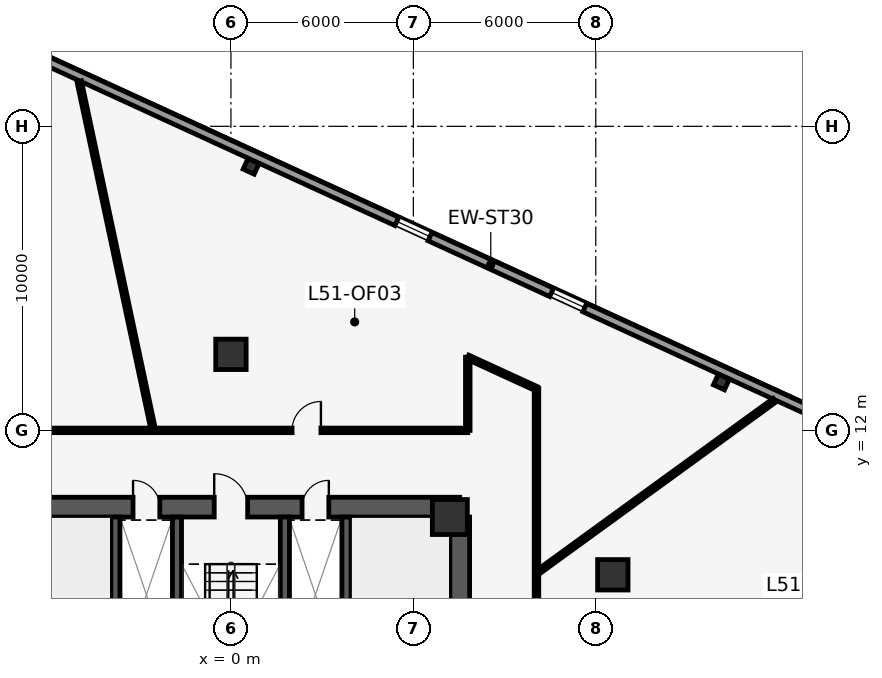
"""IFC4 building model, lengths in metres.
Left out: names, types, materials, properties, quantities, classifications, styles, units other than length and angle.
Written with IfcOpenShell. Run it as: python <this file> out.ifc"""

import sys

from ifc_helpers import new_model, si_unit, direction, frame, frame_2d, origin, origin_2d, place, context, subcontext, project, spatial, rectangle, i_section, extrude, element, fill, save


model = new_model("IFC4")
c1 = context("Model", 3, precision=1e-05, world=origin(), true_north=direction((0.0, 1.0)))
c2 = subcontext(c1, "Body", "Model", "MODEL_VIEW")
j1 = project(units=[si_unit("LENGTHUNIT", "METRE"), si_unit("PLANEANGLEUNIT", "RADIAN")], contexts=[c1])
p1 = place(None, origin())
s1 = spatial("IfcSite", under=j1, at=p1, CompositionType="ELEMENT")
p2 = place(p1, origin())
s2 = spatial("IfcBuilding", under=s1, at=p2, CompositionType="ELEMENT")
p3 = place(p2, frame((0.0, 0.0, 218.8)))
s3 = spatial("IfcBuildingStorey", under=s2, at=p3, CompositionType="ELEMENT", Elevation=218.8)
p4 = place(p3, frame((-7.525, 9.475, 0.0), z_axis=(0.0, 0.0, 1.0), x_axis=(1.0, 0.0, 0.0)))
e1 = element("IfcWall", 1, at=p4, inside=s3, PredefinedType="SHEAR", context=c2, shape_type="SweptSolid", body=[
    extrude(rectangle(XDim=15.05, YDim=0.65, at=frame_2d((7.525, 0.0))), origin(), (0.0, 0.0, 1.0), 3.85),
])
p5 = place(p4, frame((6.975, 0.0, 0.0)))
e2 = element("IfcOpeningElement", 2, at=p5, cuts=e1, PredefinedType="OPENING", context=c2, shape_type="SweptSolid", body=[
    extrude(rectangle(XDim=1.1, YDim=2.15, at=frame_2d((0.55, 1.075))), frame((0.0, 0.335, 0.0), z_axis=(0.0, -1.0, 0.0), x_axis=(1.0, 0.0, 0.0)), (0.0, 0.0, 1.0), 0.67),
])
p6 = place(p4, frame((4.305, 0.0, 0.0)))
e3 = element("IfcOpeningElement", 3, at=p6, cuts=e1, PredefinedType="OPENING", context=c2, shape_type="SweptSolid", body=[
    extrude(rectangle(XDim=0.88, YDim=2.15, at=frame_2d((0.44, 1.075))), frame((0.0, 0.335, 0.0), z_axis=(0.0, -1.0, 0.0), x_axis=(1.0, 0.0, 0.0)), (0.0, 0.0, 1.0), 0.67),
])
p7 = place(p4, frame((9.865, 0.0, 0.0)))
e4 = element("IfcOpeningElement", 4, at=p7, cuts=e1, PredefinedType="OPENING", context=c2, shape_type="SweptSolid", body=[
    extrude(rectangle(XDim=0.88, YDim=2.15, at=frame_2d((0.44, 1.075))), frame((0.0, 0.335, 0.0), z_axis=(0.0, -1.0, 0.0), x_axis=(1.0, 0.0, 0.0)), (0.0, 0.0, 1.0), 0.67),
])
for number, where, z_axis, x_axis in (
    (5, (-3.8, 1.45, 0.0), (0.0, 0.0, 1.0), (0.0, 1.0, 0.0)),
    (6, (-1.775, 1.45, 0.0), (0.0, 0.0, 1.0), (0.0, 1.0, 0.0)),
    (7, (1.775, 1.45, 0.0), (0.0, 0.0, 1.0), (0.0, 1.0, 0.0)),
    (8, (3.8, 1.45, 0.0), (0.0, 0.0, 1.0), (0.0, 1.0, 0.0)),
):
    element("IfcWall", number, at=place(p3, frame(where, z_axis=z_axis, x_axis=x_axis)), inside=s3, PredefinedType="SHEAR", context=c2, shape_type="SweptSolid", body=[
        extrude(rectangle(XDim=7.7, YDim=0.3, at=frame_2d((3.85, 0.0))), origin(), (0.0, 0.0, 1.0), 3.85),
    ])
p8 = place(p3, frame((7.525, 0.1, 0.0), z_axis=(0.0, 0.0, 1.0), x_axis=(0.0, 1.0, 0.0)))
e9 = element("IfcWall", 9, at=p8, inside=s3, PredefinedType="SHEAR", context=c2, shape_type="SweptSolid", body=[
    extrude(rectangle(XDim=9.05, YDim=0.65, at=frame_2d((4.525, 0.0))), origin(), (0.0, 0.0, 1.0), 3.85),
])
p9 = place(p3, frame((7.2, 9.15, 0.0), z_axis=(0.0, 0.0, 1.0), x_axis=(1.0, 0.0, 0.0)))
e10 = element("IfcColumn", 10, at=p9, inside=s3, PredefinedType="COLUMN", context=c2, shape_type="SweptSolid", body=[
    extrude(rectangle(XDim=1.15, YDim=1.15, at=origin_2d()), origin(), (0.0, 0.0, 1.0), 4.1),
])
for number, where, z_axis, x_axis in (
    (11, (12.56, 7.25, 0.0), (0.0, 0.0, 1.0), (1.0, 0.0, 0.0)),
    (12, (0.0, 14.5, 0.0), (0.0, 0.0, 1.0), (1.0, 0.0, 0.0)),
):
    element("IfcColumn", number, at=place(p3, frame(where, z_axis=z_axis, x_axis=x_axis)), inside=s3, PredefinedType="COLUMN", context=c2, shape_type="SweptSolid", body=[
        extrude(rectangle(XDim=1.0, YDim=1.0, at=origin_2d()), origin(), (0.0, 0.0, 1.0), 4.1),
    ])
for number, where, z_axis, x_axis in (
    (13, (16.132, 13.592, 0.0), (0.0, 0.0, 1.0), (-0.909, 0.417, 0.0)),
    (14, (0.663, 20.684, 0.0), (0.0, 0.0, 1.0), (-0.909, 0.417, 0.0)),
):
    element("IfcColumn", number, at=place(p3, frame(where, z_axis=z_axis, x_axis=x_axis)), inside=s3, PredefinedType="COLUMN", context=c2, shape_type="SweptSolid", body=[
        extrude(i_section(OverallWidth=0.399, OverallDepth=0.386, WebThickness=0.021, FlangeThickness=0.033, at=origin_2d()), origin(), (0.0, 0.0, 1.0), 4.1),
    ])
p10 = place(p3, frame((-15.144, 28.322, 0.0), z_axis=(0.0, 0.0, 1.0), x_axis=(0.908932099953, -0.416944166136, 0.0)))
e15 = element("IfcWall", 15, at=p10, inside=s3, PredefinedType="STANDARD", context=c2, shape_type="SweptSolid", body=[
    extrude(rectangle(XDim=52.128, YDim=0.3, at=frame_2d((26.064, 0.0))), origin(), (0.0, 0.0, 1.0), 3.85),
])
p11 = place(p10, frame((5.864, 0.0, 0.85)))
e16 = element("IfcOpeningElement", 16, at=p11, cuts=e15, PredefinedType="OPENING", context=c2, shape_type="SweptSolid", body=[
    extrude(rectangle(XDim=1.2, YDim=2.2, at=frame_2d((0.6, 1.1))), frame((0.0, 0.16, 0.0), z_axis=(0.0, -1.0, 0.0), x_axis=(1.0, 0.0, 0.0)), (0.0, 0.0, 1.0), 0.32),
])
p12 = place(p10, frame((22.664, 0.0, 0.85)))
e17 = element("IfcOpeningElement", 17, at=p12, cuts=e15, PredefinedType="OPENING", context=c2, shape_type="SweptSolid", body=[
    extrude(rectangle(XDim=1.2, YDim=2.2, at=frame_2d((0.6, 1.1))), frame((0.0, 0.16, 0.0), z_axis=(0.0, -1.0, 0.0), x_axis=(1.0, 0.0, 0.0)), (0.0, 0.0, 1.0), 0.32),
])
p13 = place(p10, frame((28.264, 0.0, 0.85)))
e18 = element("IfcOpeningElement", 18, at=p13, cuts=e15, PredefinedType="OPENING", context=c2, shape_type="SweptSolid", body=[
    extrude(rectangle(XDim=1.2, YDim=2.2, at=frame_2d((0.6, 1.1))), frame((0.0, 0.16, 0.0), z_axis=(0.0, -1.0, 0.0), x_axis=(1.0, 0.0, 0.0)), (0.0, 0.0, 1.0), 0.32),
])
p14 = place(p10, frame((39.464, 0.0, 0.85)))
e19 = element("IfcOpeningElement", 19, at=p14, cuts=e15, PredefinedType="OPENING", context=c2, shape_type="SweptSolid", body=[
    extrude(rectangle(XDim=1.2, YDim=2.2, at=frame_2d((0.6, 1.1))), frame((0.0, 0.16, 0.0), z_axis=(0.0, -1.0, 0.0), x_axis=(1.0, 0.0, 0.0)), (0.0, 0.0, 1.0), 0.32),
])
p15 = place(p10, frame((45.064, 0.0, 0.85)))
e20 = element("IfcOpeningElement", 20, at=p15, cuts=e15, PredefinedType="OPENING", context=c2, shape_type="SweptSolid", body=[
    extrude(rectangle(XDim=1.2, YDim=2.2, at=frame_2d((0.6, 1.1))), frame((0.0, 0.16, 0.0), z_axis=(0.0, -1.0, 0.0), x_axis=(1.0, 0.0, 0.0)), (0.0, 0.0, 1.0), 0.32),
])
p16 = place(p3, frame((-7.79, 12.0, 0.0), z_axis=(0.0, 0.0, 1.0), x_axis=(1.0, 0.0, 0.0)))
e21 = element("IfcWall", 21, at=p16, inside=s3, PredefinedType="PARTITIONING", context=c2, shape_type="SweptSolid", body=[
    extrude(rectangle(XDim=15.58, YDim=0.15, at=frame_2d((7.79, 0.0))), origin(), (0.0, 0.0, 1.0), 3.85),
])
p17 = place(p16, frame((9.8, 0.0, 0.0)))
e22 = element("IfcOpeningElement", 22, at=p17, cuts=e21, PredefinedType="OPENING", context=c2, shape_type="SweptSolid", body=[
    extrude(rectangle(XDim=0.95, YDim=2.15, at=frame_2d((0.475, 1.075))), frame((0.0, 0.085, 0.0), z_axis=(0.0, -1.0, 0.0), x_axis=(1.0, 0.0, 0.0)), (0.0, 0.0, 1.0), 0.17),
])
p18 = place(p3, frame((7.79, 12.0, 0.0), z_axis=(0.0, 0.0, 1.0), x_axis=(0.0, 1.0, 0.0)))
e23 = element("IfcWall", 23, at=p18, inside=s3, PredefinedType="PARTITIONING", context=c2, shape_type="SweptSolid", body=[
    extrude(rectangle(XDim=2.408, YDim=0.15, at=frame_2d((1.204, 0.0))), origin(), (0.0, 0.0, 1.0), 3.85),
])
p19 = place(p3, frame((7.79, 14.408, 0.0), z_axis=(0.0, 0.0, 1.0), x_axis=(0.908908252736, -0.416996148792, 0.0)))
e24 = element("IfcWall", 24, at=p19, inside=s3, PredefinedType="PARTITIONING", context=c2, shape_type="SweptSolid", body=[
    extrude(rectangle(XDim=2.487, YDim=0.15, at=frame_2d((1.243, 0.0))), origin(), (0.0, 0.0, 1.0), 3.85),
])
p20 = place(p3, frame((10.05, 13.371, 0.0), z_axis=(0.0, 0.0, 1.0), x_axis=(0.0, -1.0, 0.0)))
e25 = element("IfcWall", 25, at=p20, inside=s3, PredefinedType="PARTITIONING", context=c2, shape_type="SweptSolid", body=[
    extrude(rectangle(XDim=13.241, YDim=0.15, at=frame_2d((6.621, 0.0))), origin(), (0.0, 0.0, 1.0), 3.85),
])
p21 = place(p3, frame((10.155, 7.378, 0.0), z_axis=(0.0, 0.0, 1.0), x_axis=(0.809018998298, 0.587782494119, 0.0)))
e26 = element("IfcWall", 26, at=p21, inside=s3, PredefinedType="PARTITIONING", context=c2, shape_type="SweptSolid", body=[
    extrude(rectangle(XDim=9.55, YDim=0.15, at=frame_2d((4.775, 0.0))), origin(), (0.0, 0.0, 1.0), 3.85),
])
p22 = place(p3, frame((-2.573, 12.105, 0.0), z_axis=(0.0, 0.0, 1.0), x_axis=(-0.207903435497, 0.97814935542, 0.0)))
e27 = element("IfcWall", 27, at=p22, inside=s3, PredefinedType="PARTITIONING", context=c2, shape_type="SweptSolid", body=[
    extrude(rectangle(XDim=11.633, YDim=0.15, at=frame_2d((5.816, 0.0))), origin(), (0.0, 0.0, 1.0), 3.85),
])
p23 = place(p12, origin())
e28 = element("IfcWindow", 28, at=p23, inside=s3, PartitioningType="SINGLE_PANEL", PredefinedType="WINDOW", context=c2, shape_type="SweptSolid", body=[
    extrude(rectangle(XDim=1.2, YDim=2.2, at=frame_2d((0.6, 1.1))), frame((0.0, 0.03, 0.0), z_axis=(0.0, -1.0, 0.0), x_axis=(1.0, 0.0, 0.0)), (0.0, 0.0, 1.0), 0.06),
])
fill(e17, e28)
p24 = place(p13, origin())
e29 = element("IfcWindow", 29, at=p24, inside=s3, PartitioningType="SINGLE_PANEL", PredefinedType="WINDOW", context=c2, shape_type="SweptSolid", body=[
    extrude(rectangle(XDim=1.2, YDim=2.2, at=frame_2d((0.6, 1.1))), frame((0.0, 0.03, 0.0), z_axis=(0.0, -1.0, 0.0), x_axis=(1.0, 0.0, 0.0)), (0.0, 0.0, 1.0), 0.06),
])
fill(e18, e29)
p25 = place(p5, origin())
e30 = element("IfcDoor", 30, at=p25, inside=s3, OperationType="SINGLE_SWING_LEFT", PredefinedType="DOOR", context=c2, shape_type="SweptSolid", body=[
    extrude(rectangle(XDim=1.1, YDim=2.15, at=frame_2d((0.55, 1.075))), frame((0.0, 0.025, 0.0), z_axis=(0.0, -1.0, 0.0), x_axis=(1.0, 0.0, 0.0)), (0.0, 0.0, 1.0), 0.05),
])
fill(e2, e30)
p26 = place(p6, origin())
e31 = element("IfcDoor", 31, at=p26, inside=s3, OperationType="SINGLE_SWING_LEFT", PredefinedType="DOOR", context=c2, shape_type="SweptSolid", body=[
    extrude(rectangle(XDim=0.88, YDim=2.15, at=frame_2d((0.44, 1.075))), frame((0.0, 0.025, 0.0), z_axis=(0.0, -1.0, 0.0), x_axis=(1.0, 0.0, 0.0)), (0.0, 0.0, 1.0), 0.05),
])
fill(e3, e31)
p27 = place(p7, origin())
e32 = element("IfcDoor", 32, at=p27, inside=s3, OperationType="SINGLE_SWING_RIGHT", PredefinedType="DOOR", context=c2, shape_type="SweptSolid", body=[
    extrude(rectangle(XDim=0.88, YDim=2.15, at=frame_2d((0.44, 1.075))), frame((0.0, 0.025, 0.0), z_axis=(0.0, -1.0, 0.0), x_axis=(1.0, 0.0, 0.0)), (0.0, 0.0, 1.0), 0.05),
])
fill(e4, e32)
p28 = place(p17, origin())
e33 = element("IfcDoor", 33, at=p28, inside=s3, OperationType="SINGLE_SWING_RIGHT", PredefinedType="DOOR", context=c2, shape_type="SweptSolid", body=[
    extrude(rectangle(XDim=0.95, YDim=2.15, at=frame_2d((0.475, 1.075))), frame((0.0, 0.025, 0.0), z_axis=(0.0, -1.0, 0.0), x_axis=(1.0, 0.0, 0.0)), (0.0, 0.0, 1.0), 0.05),
])
fill(e22, e33)
save(model, sys.argv[1])
